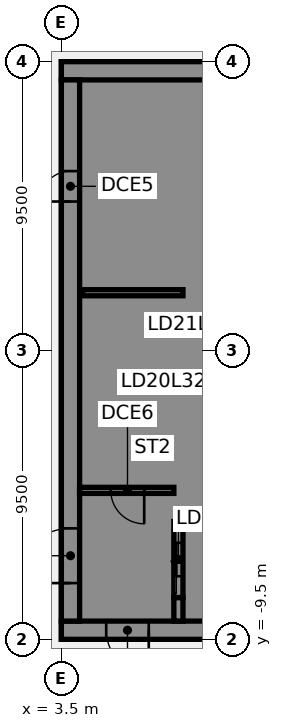
"""IFC4 building model, lengths in metres.
Left out: names, types, materials, properties, quantities, classifications, styles, units other than length and angle.
Written with IfcOpenShell. Run it as: python <this file> out.ifc"""

import sys

from ifc_helpers import new_model, si_unit, direction, frame, frame_2d, origin, place, context, subcontext, project, spatial, polyline, rectangle, outline, extrude, element, fill, save


model = new_model("IFC4")
c1 = context("Model", 3, precision=1e-05, world=origin(), true_north=direction((0.0, 1.0)))
c2 = subcontext(c1, "Body", "Model", "MODEL_VIEW")
j1 = project(units=[si_unit("LENGTHUNIT", "METRE"), si_unit("PLANEANGLEUNIT", "RADIAN")], contexts=[c1])
p1 = place(None, origin())
s1 = spatial("IfcSite", under=j1, at=p1, CompositionType="ELEMENT")
p2 = place(p1, origin())
s2 = spatial("IfcBuilding", under=s1, at=p2, CompositionType="ELEMENT")
p3 = place(p2, frame((0.0, 0.0, 133.0)))
s3 = spatial("IfcBuildingStorey", under=s2, at=p3, CompositionType="ELEMENT", Elevation=133.0)
p4 = place(p3, frame((16.5, -9.2, 0.0), z_axis=(0.0, 0.0, 1.0), x_axis=(-1.0, 0.0, 0.0)))
e1 = element("IfcWall", 1, at=p4, inside=s3, PredefinedType="SHEAR", context=c2, shape_type="SweptSolid", body=[
    extrude(rectangle(XDim=13.0, YDim=0.6, at=frame_2d((6.5, 0.0))), origin(), (0.0, 0.0, 1.0), 3.61),
])
p5 = place(p4, frame((4.15, 0.0, 0.0)))
e2 = element("IfcOpeningElement", 2, at=p5, cuts=e1, PredefinedType="OPENING", context=c2, shape_type="SweptSolid", body=[
    extrude(rectangle(XDim=1.4, YDim=2.1, at=frame_2d((0.7, 1.05))), frame((0.0, 0.31, 0.0), z_axis=(0.0, -1.0, 0.0), x_axis=(1.0, 0.0, 0.0)), (0.0, 0.0, 1.0), 0.62),
])
p6 = place(p4, frame((10.125, 0.0, 0.0)))
e3 = element("IfcOpeningElement", 3, at=p6, cuts=e1, PredefinedType="OPENING", context=c2, shape_type="SweptSolid", body=[
    extrude(rectangle(XDim=1.4, YDim=2.1, at=frame_2d((0.7, 1.05))), frame((0.0, 0.31, 0.0), z_axis=(0.0, -1.0, 0.0), x_axis=(1.0, 0.0, 0.0)), (0.0, 0.0, 1.0), 0.62),
])
p7 = place(p3, frame((16.5, 9.2, 0.0), z_axis=(0.0, 0.0, 1.0), x_axis=(-1.0, 0.0, 0.0)))
e4 = element("IfcWall", 4, at=p7, inside=s3, PredefinedType="SHEAR", context=c2, shape_type="SweptSolid", body=[
    extrude(rectangle(XDim=13.0, YDim=0.6, at=frame_2d((6.5, 0.0))), origin(), (0.0, 0.0, 1.0), 3.61),
])
p8 = place(p3, origin())
e5 = element("IfcWall", 5, at=p8, inside=s3, PredefinedType="SHEAR", context=c2, shape_type="SweptSolid", body=[
    extrude(outline(polyline([(9.8, -5.375), (7.5, -5.375), (7.5, -2.875), (9.8, -2.875), (9.8, -2.625), (7.5, -2.625), (7.5, -0.125), (9.8, -0.125), (9.8, 0.125), (7.5, 0.125), (7.5, 2.625), (9.8, 2.625), (9.8, 2.875), (7.5, 2.875), (7.5, 5.375), (9.8, 5.375), (9.8, 5.625), (7.5, 5.625), (7.5, 8.125), (9.8, 8.125), (9.8, 8.9), (7.5, 8.9), (7.2, 8.9), (7.2, -5.625), (7.5, -5.625), (9.8, -5.625), (9.8, -5.375)])), origin(), (0.0, 0.0, 1.0), 3.61),
])
p9 = place(p3, origin())
e6 = element("IfcWall", 6, at=p9, inside=s3, PredefinedType="SHEAR", context=c2, shape_type="SweptSolid", body=[
    extrude(outline(polyline([(7.5, -8.125), (7.5, -8.9), (9.8, -8.9), (9.8, -8.125), (9.8, -5.625), (9.55, -5.625), (9.55, -8.125), (7.5, -8.125)])), origin(), (0.0, 0.0, 1.0), 3.61),
])
p10 = place(p3, frame((7.35, -8.9, 0.0), z_axis=(0.0, 0.0, 1.0), x_axis=(0.0, 1.0, 0.0)))
e7 = element("IfcWall", 7, at=p10, inside=s3, PredefinedType="SHEAR", context=c2, shape_type="SweptSolid", body=[
    extrude(rectangle(XDim=0.775, YDim=0.3, at=frame_2d((0.387, 0.0))), origin(), (0.0, 0.0, 1.0), 3.61),
])
p11 = place(p3, frame((7.5, 1.9, 0.0), z_axis=(0.0, 0.0, 1.0), x_axis=(-1.0, 0.0, 0.0)))
e8 = element("IfcWall", 8, at=p11, inside=s3, PredefinedType="SHEAR", context=c2, shape_type="SweptSolid", body=[
    extrude(rectangle(XDim=3.3, YDim=0.2, at=frame_2d((1.65, 0.0))), origin(), (0.0, 0.0, 1.0), 3.61),
])
p12 = place(p3, frame((7.35, -8.125, 0.0), z_axis=(0.0, 0.0, 1.0), x_axis=(0.0, 1.0, 0.0)))
e9 = element("IfcWall", 9, at=p12, inside=s3, PredefinedType="SHEAR", context=c2, shape_type="SweptSolid", body=[
    extrude(rectangle(XDim=2.5, YDim=0.3, at=frame_2d((1.25, 0.0))), origin(), (0.0, 0.0, 1.0), 3.61),
])
p13 = place(p12, frame((0.7, 0.0, 0.0)))
e10 = element("IfcOpeningElement", 10, at=p13, cuts=e9, PredefinedType="OPENING", context=c2, shape_type="SweptSolid", body=[
    extrude(rectangle(XDim=1.1, YDim=2.1, at=frame_2d((0.55, 1.05))), frame((0.0, 0.16, 0.0), z_axis=(0.0, -1.0, 0.0), x_axis=(1.0, 0.0, 0.0)), (0.0, 0.0, 1.0), 0.32),
])
p14 = place(p3, frame((3.8, -8.9, 0.0), z_axis=(0.0, 0.0, 1.0), x_axis=(0.0, 1.0, 0.0)))
e11 = element("IfcWall", 11, at=p14, inside=s3, PredefinedType="SHEAR", context=c2, shape_type="SweptSolid", body=[
    extrude(rectangle(XDim=17.8, YDim=0.6, at=frame_2d((8.9, 0.0))), origin(), (0.0, 0.0, 1.0), 3.61),
])
p15 = place(p14, frame((1.25, 0.0, 0.0)))
e12 = element("IfcOpeningElement", 12, at=p15, cuts=e11, PredefinedType="OPENING", context=c2, shape_type="SweptSolid", body=[
    extrude(rectangle(XDim=1.8, YDim=2.1, at=frame_2d((0.9, 1.05))), frame((0.0, 0.31, 0.0), z_axis=(0.0, -1.0, 0.0), x_axis=(1.0, 0.0, 0.0)), (0.0, 0.0, 1.0), 0.62),
])
p16 = place(p14, frame((13.8, 0.0, 0.0)))
e13 = element("IfcOpeningElement", 13, at=p16, cuts=e11, PredefinedType="OPENING", context=c2, shape_type="SweptSolid", body=[
    extrude(rectangle(XDim=1.0, YDim=2.1, at=frame_2d((0.5, 1.05))), frame((0.0, 0.31, 0.0), z_axis=(0.0, -1.0, 0.0), x_axis=(1.0, 0.0, 0.0)), (0.0, 0.0, 1.0), 0.62),
])
p17 = place(p3, frame((7.2, -4.6, 0.0), z_axis=(0.0, 0.0, 1.0), x_axis=(-1.0, 0.0, 0.0)))
e14 = element("IfcWall", 14, at=p17, inside=s3, PredefinedType="SHEAR", context=c2, shape_type="SweptSolid", body=[
    extrude(rectangle(XDim=3.1, YDim=0.2, at=frame_2d((1.55, 0.0))), origin(), (0.0, 0.0, 1.0), 3.61),
])
p18 = place(p17, frame((0.975, 0.0, 0.0)))
e15 = element("IfcOpeningElement", 15, at=p18, cuts=e14, PredefinedType="OPENING", context=c2, shape_type="SweptSolid", body=[
    extrude(rectangle(XDim=1.1, YDim=2.1, at=frame_2d((0.55, 1.05))), frame((0.0, 0.11, 0.0), z_axis=(0.0, -1.0, 0.0), x_axis=(1.0, 0.0, 0.0)), (0.0, 0.0, 1.0), 0.22),
])
p19 = place(p6, origin())
e16 = element("IfcDoor", 16, at=p19, inside=s3, OperationType="SINGLE_SWING_LEFT", PredefinedType="DOOR", context=c2, shape_type="SweptSolid", body=[
    extrude(rectangle(XDim=1.4, YDim=2.1, at=frame_2d((0.7, 1.05))), frame((0.0, 0.025, 0.0), z_axis=(0.0, -1.0, 0.0), x_axis=(1.0, 0.0, 0.0)), (0.0, 0.0, 1.0), 0.05),
])
fill(e3, e16)
p20 = place(p15, origin())
e17 = element("IfcDoor", 17, at=p20, inside=s3, OperationType="SINGLE_SWING_LEFT", PredefinedType="DOOR", context=c2, shape_type="SweptSolid", body=[
    extrude(rectangle(XDim=1.8, YDim=2.1, at=frame_2d((0.9, 1.05))), frame((0.0, 0.025, 0.0), z_axis=(0.0, -1.0, 0.0), x_axis=(1.0, 0.0, 0.0)), (0.0, 0.0, 1.0), 0.05),
])
fill(e12, e17)
p21 = place(p16, origin())
e18 = element("IfcDoor", 18, at=p21, inside=s3, OperationType="SINGLE_SWING_LEFT", PredefinedType="DOOR", context=c2, shape_type="SweptSolid", body=[
    extrude(rectangle(XDim=1.0, YDim=2.1, at=frame_2d((0.5, 1.05))), frame((0.0, 0.025, 0.0), z_axis=(0.0, -1.0, 0.0), x_axis=(1.0, 0.0, 0.0)), (0.0, 0.0, 1.0), 0.05),
])
fill(e13, e18)
p22 = place(p18, origin())
e19 = element("IfcDoor", 19, at=p22, inside=s3, OperationType="SINGLE_SWING_LEFT", PredefinedType="DOOR", context=c2, shape_type="SweptSolid", body=[
    extrude(rectangle(XDim=1.1, YDim=2.1, at=frame_2d((0.55, 1.05))), frame((0.0, 0.025, 0.0), z_axis=(0.0, -1.0, 0.0), x_axis=(1.0, 0.0, 0.0)), (0.0, 0.0, 1.0), 0.05),
])
fill(e15, e19)
p23 = place(p13, origin())
e20 = element("IfcDoor", 20, at=p23, inside=s3, OperationType="SLIDING_TO_LEFT", PredefinedType="DOOR", context=c2, shape_type="SweptSolid", body=[
    extrude(rectangle(XDim=1.1, YDim=2.1, at=frame_2d((0.55, 1.05))), frame((0.0, 0.025, 0.0), z_axis=(0.0, -1.0, 0.0), x_axis=(1.0, 0.0, 0.0)), (0.0, 0.0, 1.0), 0.05),
])
fill(e10, e20)
save(model, sys.argv[1])
